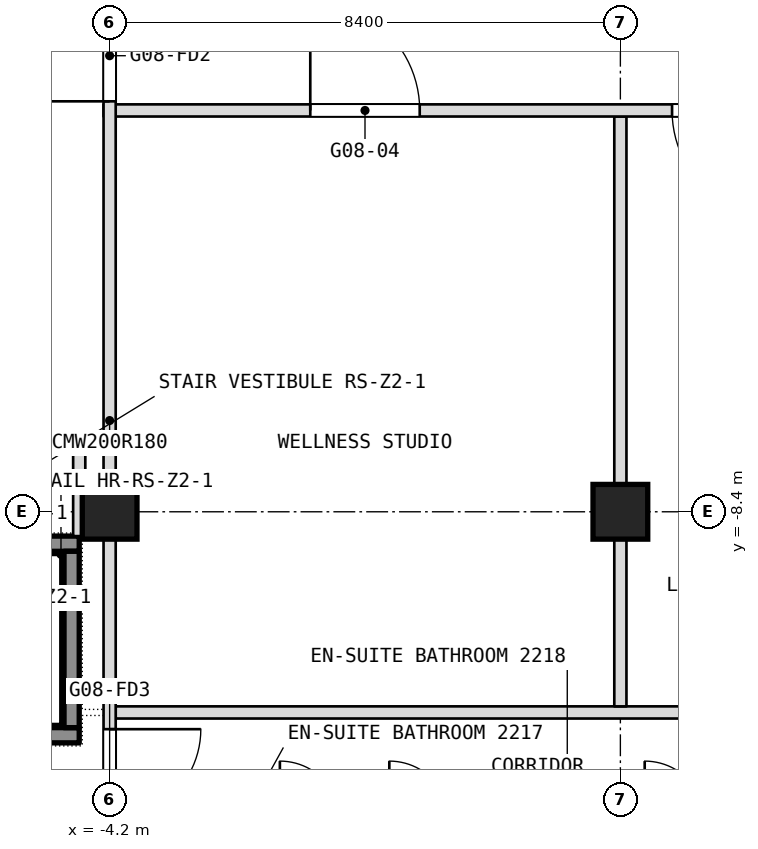
"""IFC4 building model, lengths in metres.
Left out: names, types, materials, properties, quantities, classifications, styles, units other than length and angle.
Written with IfcOpenShell. Run it as: python <this file> out.ifc"""

import sys

from ifc_helpers import new_model, si_unit, direction, frame, frame_2d, origin, origin_2d, place, context, subcontext, project, spatial, rectangle, extrude, element, fill, save


model = new_model("IFC4")
c1 = context("Model", 3, precision=1e-05, world=origin(), true_north=direction((0.0, 1.0)))
c2 = subcontext(c1, "Body", "Model", "MODEL_VIEW")
j1 = project(units=[si_unit("LENGTHUNIT", "METRE"), si_unit("PLANEANGLEUNIT", "RADIAN")], contexts=[c1])
p1 = place(None, origin())
s1 = spatial("IfcSite", under=j1, at=p1, CompositionType="ELEMENT")
p2 = place(p1, origin())
s2 = spatial("IfcBuilding", under=s1, at=p2, CompositionType="ELEMENT")
p3 = place(p2, frame((0.0, 0.0, 104.9)))
s3 = spatial("IfcBuildingStorey", under=s2, at=p3, CompositionType="ELEMENT", Elevation=104.9)
for number, where, z_axis, x_axis in (
    (1, (-4.2, -8.4, 0.0), (0.0, 0.0, 1.0), (1.0, 0.0, 0.0)),
    (2, (4.2, -8.4, 0.0), (0.0, 0.0, 1.0), (1.0, 0.0, 0.0)),
):
    element("IfcColumn", number, at=place(p3, frame(where, z_axis=z_axis, x_axis=x_axis)), inside=s3, PredefinedType="COLUMN", context=c2, shape_type="SweptSolid", body=[
        extrude(rectangle(XDim=0.9, YDim=0.9, at=origin_2d()), origin(), (0.0, 0.0, 1.0), 3.6),
    ])
p4 = place(p3, frame((-4.1, -11.7, 0.0), z_axis=(0.0, 0.0, 1.0), x_axis=(1.0, 0.0, 0.0)))
e3 = element("IfcWall", 3, at=p4, inside=s3, PredefinedType="PARTITIONING", context=c2, shape_type="SweptSolid", body=[
    extrude(rectangle(XDim=20.8, YDim=0.2, at=frame_2d((10.4, 0.0))), origin(), (0.0, 0.0, 1.0), 3.34),
])
p5 = place(p3, frame((-8.5, -7.2, 0.0), z_axis=(0.0, 0.0, 1.0), x_axis=(1.0, 0.0, 0.0)))
e4 = element("IfcWall", 4, at=p5, inside=s3, PredefinedType="PARTITIONING", context=c2, shape_type="SweptSolid", body=[
    extrude(rectangle(XDim=3.7, YDim=0.2, at=frame_2d((1.85, 0.0))), origin(), (0.0, 0.0, 1.0), 3.34),
])
p6 = place(p5, frame((0.25, 0.0, 0.0)))
e5 = element("IfcOpeningElement", 5, at=p6, cuts=e4, PredefinedType="OPENING", context=c2, shape_type="SweptSolid", body=[
    extrude(rectangle(XDim=0.9, YDim=2.1, at=frame_2d((0.45, 1.05))), frame((0.0, 0.1, 0.0), z_axis=(0.0, -1.0, 0.0), x_axis=(1.0, 0.0, 0.0)), (0.0, 0.0, 1.0), 0.2),
])
p7 = place(p3, frame((4.2, -11.6, 0.0), z_axis=(0.0, 0.0, 1.0), x_axis=(0.0, 1.0, 0.0)))
e6 = element("IfcWall", 6, at=p7, inside=s3, PredefinedType="PARTITIONING", context=c2, shape_type="SweptSolid", body=[
    extrude(rectangle(XDim=9.7, YDim=0.2, at=frame_2d((4.85, 0.0))), origin(), (0.0, 0.0, 1.0), 3.34),
])
p8 = place(p3, frame((-4.3, -1.8, 0.0), z_axis=(0.0, 0.0, 1.0), x_axis=(1.0, 0.0, 0.0)))
e7 = element("IfcWall", 7, at=p8, inside=s3, PredefinedType="PARTITIONING", context=c2, shape_type="SweptSolid", body=[
    extrude(rectangle(XDim=11.3, YDim=0.2, at=frame_2d((5.65, 0.0))), origin(), (0.0, 0.0, 1.0), 3.34),
])
p9 = place(p8, frame((3.4, 0.0, 0.0)))
e8 = element("IfcOpeningElement", 8, at=p9, cuts=e7, PredefinedType="OPENING", context=c2, shape_type="SweptSolid", body=[
    extrude(rectangle(XDim=1.8, YDim=2.1, at=frame_2d((0.9, 1.05))), frame((0.0, 0.1, 0.0), z_axis=(0.0, -1.0, 0.0), x_axis=(1.0, 0.0, 0.0)), (0.0, 0.0, 1.0), 0.2),
])
p10 = place(p8, frame((9.35, 0.0, 0.0)))
e9 = element("IfcOpeningElement", 9, at=p10, cuts=e7, PredefinedType="OPENING", context=c2, shape_type="SweptSolid", body=[
    extrude(rectangle(XDim=1.8, YDim=2.1, at=frame_2d((0.9, 1.05))), frame((0.0, 0.1, 0.0), z_axis=(0.0, -1.0, 0.0), x_axis=(1.0, 0.0, 0.0)), (0.0, 0.0, 1.0), 0.2),
])
p11 = place(p3, frame((-4.2, -13.8, 0.0), z_axis=(0.0, 0.0, 1.0), x_axis=(0.0, 1.0, 0.0)))
e10 = element("IfcWall", 10, at=p11, inside=s3, PredefinedType="PARTITIONING", context=c2, shape_type="SweptSolid", body=[
    extrude(rectangle(XDim=13.8, YDim=0.2, at=frame_2d((6.9, 0.0))), origin(), (0.0, 0.0, 1.0), 3.34),
])
p12 = place(p11, frame((12.15, 0.0, 0.0)))
e11 = element("IfcOpeningElement", 11, at=p12, cuts=e10, PredefinedType="OPENING", context=c2, shape_type="SweptSolid", body=[
    extrude(rectangle(XDim=1.5, YDim=2.1, at=frame_2d((0.75, 1.05))), frame((0.0, 0.1, 0.0), z_axis=(0.0, -1.0, 0.0), x_axis=(1.0, 0.0, 0.0)), (0.0, 0.0, 1.0), 0.2),
])
p13 = place(p11, frame((0.325, 0.0, 0.0)))
e12 = element("IfcOpeningElement", 12, at=p13, cuts=e10, PredefinedType="OPENING", context=c2, shape_type="SweptSolid", body=[
    extrude(rectangle(XDim=1.5, YDim=2.1, at=frame_2d((0.75, 1.05))), frame((0.0, 0.1, 0.0), z_axis=(0.0, -1.0, 0.0), x_axis=(1.0, 0.0, 0.0)), (0.0, 0.0, 1.0), 0.2),
])
p14 = place(p3, frame((-4.7, -8.8, 0.0), z_axis=(0.0, 0.0, 1.0), x_axis=(0.0, 1.0, 0.0)))
e13 = element("IfcWall", 13, at=p14, inside=s3, PredefinedType="PARTITIONING", context=c2, shape_type="SweptSolid", body=[
    extrude(rectangle(XDim=1.7, YDim=0.2, at=frame_2d((0.85, 0.0))), origin(), (0.0, 0.0, 1.0), 3.34),
])
p15 = place(p3, frame((-10.9, -12.075, 0.1), z_axis=(0.0, 0.0, 1.0), x_axis=(1.0, 0.0, 0.0)))
e14 = element("IfcWall", 14, at=p15, inside=s3, PredefinedType="SHEAR", context=c2, shape_type="SweptSolid", body=[
    extrude(rectangle(XDim=6.2, YDim=0.25, at=frame_2d((3.1, 0.0))), origin(), (0.0, 0.0, 1.0), 3.6),
])
p16 = place(p3, frame((-10.9, -8.925, 0.1), z_axis=(0.0, 0.0, 1.0), x_axis=(1.0, 0.0, 0.0)))
e15 = element("IfcWall", 15, at=p16, inside=s3, PredefinedType="SHEAR", context=c2, shape_type="SweptSolid", body=[
    extrude(rectangle(XDim=6.2, YDim=0.25, at=frame_2d((3.1, 0.0))), origin(), (0.0, 0.0, 1.0), 3.6),
])
p17 = place(p16, frame((0.45, 0.0, 0.0)))
e16 = element("IfcOpeningElement", 16, at=p17, cuts=e15, PredefinedType="OPENING", context=c2, shape_type="SweptSolid", body=[
    extrude(rectangle(XDim=1.0, YDim=2.1, at=frame_2d((0.5, 1.05))), frame((0.0, 0.125, 0.0), z_axis=(0.0, -1.0, 0.0), x_axis=(1.0, 0.0, 0.0)), (0.0, 0.0, 1.0), 0.25),
])
p18 = place(p3, frame((-4.825, -11.95, 0.1), z_axis=(0.0, 0.0, 1.0), x_axis=(0.0, 1.0, 0.0)))
e17 = element("IfcWall", 17, at=p18, inside=s3, PredefinedType="SHEAR", context=c2, shape_type="SweptSolid", body=[
    extrude(rectangle(XDim=2.9, YDim=0.25, at=frame_2d((1.45, 0.0))), origin(), (0.0, 0.0, 1.0), 3.6),
])
p19 = place(p9, origin())
e18 = element("IfcDoor", 18, at=p19, inside=s3, OperationType="DOUBLE_DOOR_SINGLE_SWING", PredefinedType="DOOR", context=c2, shape_type="SweptSolid", body=[
    extrude(rectangle(XDim=1.8, YDim=2.1, at=frame_2d((0.9, 1.05))), frame((0.0, 0.025, 0.0), z_axis=(0.0, -1.0, 0.0), x_axis=(1.0, 0.0, 0.0)), (0.0, 0.0, 1.0), 0.05),
])
fill(e8, e18)
p20 = place(p10, origin())
e19 = element("IfcDoor", 19, at=p20, inside=s3, OperationType="DOUBLE_DOOR_SINGLE_SWING", PredefinedType="DOOR", context=c2, shape_type="SweptSolid", body=[
    extrude(rectangle(XDim=1.8, YDim=2.1, at=frame_2d((0.9, 1.05))), frame((0.0, 0.025, 0.0), z_axis=(0.0, -1.0, 0.0), x_axis=(1.0, 0.0, 0.0)), (0.0, 0.0, 1.0), 0.05),
])
fill(e9, e19)
p21 = place(p12, origin())
e20 = element("IfcDoor", 20, at=p21, inside=s3, OperationType="DOUBLE_DOOR_DOUBLE_SWING", PredefinedType="DOOR", context=c2, shape_type="SweptSolid", body=[
    extrude(rectangle(XDim=1.5, YDim=2.1, at=frame_2d((0.75, 1.05))), frame((0.0, 0.025, 0.0), z_axis=(0.0, -1.0, 0.0), x_axis=(1.0, 0.0, 0.0)), (0.0, 0.0, 1.0), 0.05),
])
fill(e11, e20)
p22 = place(p13, origin())
e21 = element("IfcDoor", 21, at=p22, inside=s3, OperationType="DOUBLE_DOOR_DOUBLE_SWING", PredefinedType="DOOR", context=c2, shape_type="SweptSolid", body=[
    extrude(rectangle(XDim=1.5, YDim=2.1, at=frame_2d((0.75, 1.05))), frame((0.0, 0.025, 0.0), z_axis=(0.0, -1.0, 0.0), x_axis=(1.0, 0.0, 0.0)), (0.0, 0.0, 1.0), 0.05),
])
fill(e12, e21)
save(model, sys.argv[1])
